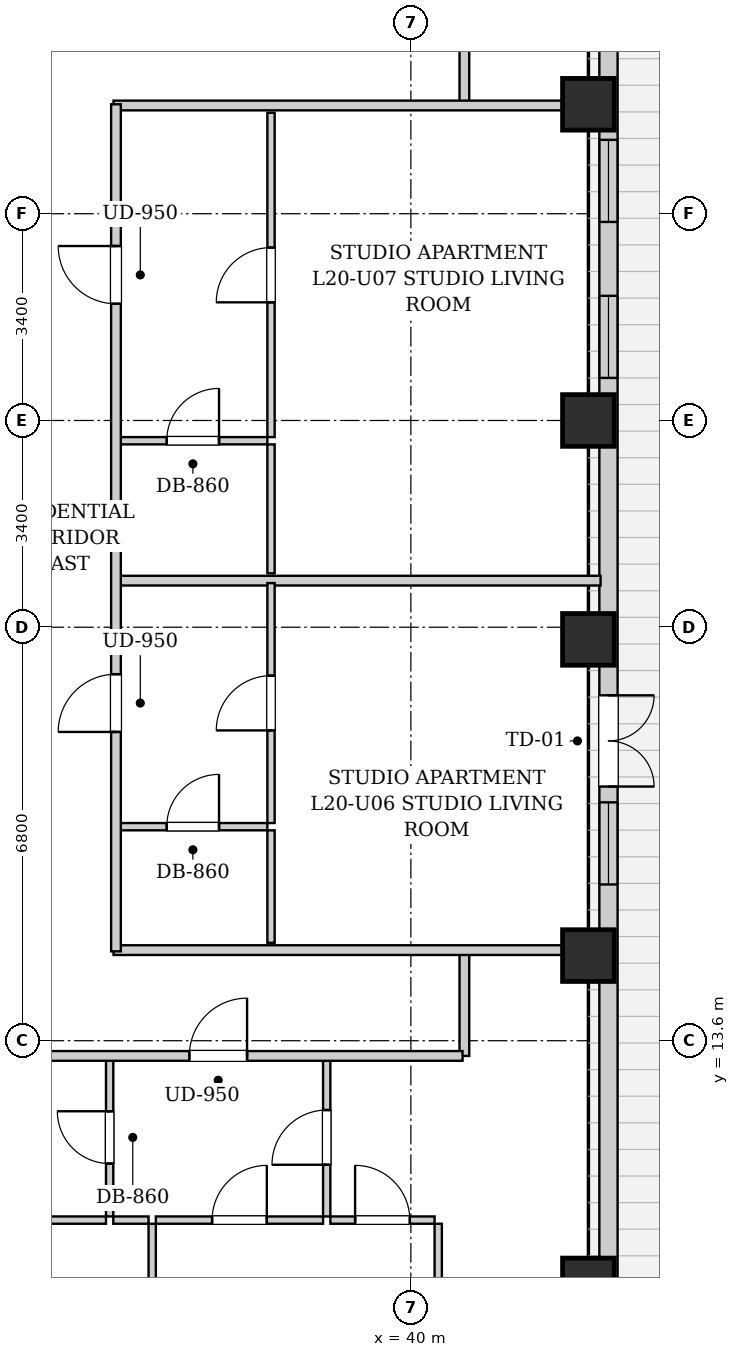
"""IFC4 building model, lengths in metres.
Left out: names, types, materials, properties, quantities, classifications, styles, units other than length and angle.
Written with IfcOpenShell. Run it as: python <this file> out.ifc"""

import sys

from ifc_helpers import new_model, si_unit, direction, frame, frame_2d, origin, origin_2d, place, context, subcontext, project, spatial, rectangle, extrude, element, fill, save


model = new_model("IFC4")
c1 = context("Model", 3, precision=1e-05, world=origin(), true_north=direction((0.0, 1.0)))
c2 = subcontext(c1, "Body", "Model", "MODEL_VIEW")
j1 = project(units=[si_unit("LENGTHUNIT", "METRE"), si_unit("PLANEANGLEUNIT", "RADIAN")], contexts=[c1])
p1 = place(None, origin())
s1 = spatial("IfcSite", under=j1, at=p1, CompositionType="ELEMENT")
p2 = place(p1, origin())
s2 = spatial("IfcBuilding", under=s1, at=p2, CompositionType="ELEMENT")
p3 = place(p2, frame((0.0, 0.0, 75.1)))
s3 = spatial("IfcBuildingStorey", under=s2, at=p3, CompositionType="ELEMENT", Elevation=75.1)
for number, where, z_axis, x_axis in (
    (1, (42.92, 9.6, 0.0), (0.0, 0.0, 1.0), (1.0, 0.0, 0.0)),
    (2, (42.92, 15.0, 0.0), (0.0, 0.0, 1.0), (1.0, 0.0, 0.0)),
    (3, (42.92, 20.2, 0.0), (0.0, 0.0, 1.0), (1.0, 0.0, 0.0)),
    (4, (42.92, 23.8, 0.0), (0.0, 0.0, 1.0), (1.0, 0.0, 0.0)),
    (5, (42.92, 29.0, 0.0), (0.0, 0.0, 1.0), (1.0, 0.0, 0.0)),
):
    element("IfcColumn", number, at=place(p3, frame(where, z_axis=z_axis, x_axis=x_axis)), inside=s3, PredefinedType="COLUMN", context=c2, shape_type="SweptSolid", body=[
        extrude(rectangle(XDim=0.85, YDim=0.85, at=origin_2d()), origin(), (0.0, 0.0, 1.0), 3.2),
    ])
p4 = place(p3, frame((43.25, 40.8, 0.0), z_axis=(0.0, 0.0, 1.0), x_axis=(0.0, -1.0, 0.0)))
e6 = element("IfcWall", 6, at=p4, inside=s3, PredefinedType="SOLIDWALL", context=c2, shape_type="SweptSolid", body=[
    extrude(rectangle(XDim=38.3, YDim=0.3, at=frame_2d((19.15, 0.0))), origin(), (0.0, 0.0, 1.0), 2.94),
])
p5 = place(p4, frame((21.52, 0.0, 0.0)))
e7 = element("IfcOpeningElement", 7, at=p5, cuts=e6, PredefinedType="OPENING", context=c2, shape_type="SweptSolid", body=[
    extrude(rectangle(XDim=1.5, YDim=1.982, at=frame_2d((0.75, 0.991))), frame((0.0, 0.16, 0.0), z_axis=(0.0, -1.0, 0.0), x_axis=(1.0, 0.0, 0.0)), (0.0, 0.0, 1.0), 0.32),
])
p6 = place(p4, frame((33.495, 0.0, 0.55)))
e8 = element("IfcOpeningElement", 8, at=p6, cuts=e6, PredefinedType="OPENING", context=c2, shape_type="SweptSolid", body=[
    extrude(rectangle(XDim=1.35, YDim=1.2, at=frame_2d((0.675, 0.6))), frame((0.0, 0.16, 0.0), z_axis=(0.0, -1.0, 0.0), x_axis=(1.0, 0.0, 0.0)), (0.0, 0.0, 1.0), 0.32),
])
p7 = place(p4, frame((31.785, 0.0, 0.55)))
e9 = element("IfcOpeningElement", 9, at=p7, cuts=e6, PredefinedType="OPENING", context=c2, shape_type="SweptSolid", body=[
    extrude(rectangle(XDim=1.35, YDim=1.2, at=frame_2d((0.675, 0.6))), frame((0.0, 0.16, 0.0), z_axis=(0.0, -1.0, 0.0), x_axis=(1.0, 0.0, 0.0)), (0.0, 0.0, 1.0), 0.32),
])
p8 = place(p4, frame((23.28, 0.0, 0.55)))
e10 = element("IfcOpeningElement", 10, at=p8, cuts=e6, PredefinedType="OPENING", context=c2, shape_type="SweptSolid", body=[
    extrude(rectangle(XDim=1.35, YDim=1.2, at=frame_2d((0.675, 0.6))), frame((0.0, 0.16, 0.0), z_axis=(0.0, -1.0, 0.0), x_axis=(1.0, 0.0, 0.0)), (0.0, 0.0, 1.0), 0.32),
])
p9 = place(p4, frame((14.95, 0.0, 0.55)))
e11 = element("IfcOpeningElement", 11, at=p9, cuts=e6, PredefinedType="OPENING", context=c2, shape_type="SweptSolid", body=[
    extrude(rectangle(XDim=1.35, YDim=1.2, at=frame_2d((0.675, 0.6))), frame((0.0, 0.16, 0.0), z_axis=(0.0, -1.0, 0.0), x_axis=(1.0, 0.0, 0.0)), (0.0, 0.0, 1.0), 0.32),
])
p10 = place(p4, frame((12.385, 0.0, 0.55)))
e12 = element("IfcOpeningElement", 12, at=p10, cuts=e6, PredefinedType="OPENING", context=c2, shape_type="SweptSolid", body=[
    extrude(rectangle(XDim=1.35, YDim=1.2, at=frame_2d((0.675, 0.6))), frame((0.0, 0.16, 0.0), z_axis=(0.0, -1.0, 0.0), x_axis=(1.0, 0.0, 0.0)), (0.0, 0.0, 1.0), 0.32),
])
for number, where, z_axis, x_axis in (
    (13, (40.88, 13.35, 0.0), (0.0, 0.0, 1.0), (0.0, 1.0, 0.0)),
    (14, (40.88, 28.98, 0.0), (0.0, 0.0, 1.0), (0.0, 1.0, 0.0)),
):
    element("IfcWall", number, at=place(p3, frame(where, z_axis=z_axis, x_axis=x_axis)), inside=s3, PredefinedType="PARTITIONING", context=c2, shape_type="SweptSolid", body=[
        extrude(rectangle(XDim=1.74, YDim=0.16, at=frame_2d((0.87, 0.0))), origin(), (0.0, 0.0, 1.0), 2.94),
    ])
for number, where, z_axis, x_axis in (
    (15, (35.11, 15.09, 0.0), (0.0, 0.0, 1.0), (1.0, 0.0, 0.0)),
    (16, (35.11, 28.98, 0.0), (0.0, 0.0, 1.0), (1.0, 0.0, 0.0)),
):
    element("IfcWall", number, at=place(p3, frame(where, z_axis=z_axis, x_axis=x_axis)), inside=s3, PredefinedType="PARTITIONING", context=c2, shape_type="SweptSolid", body=[
        extrude(rectangle(XDim=8.01, YDim=0.16, at=frame_2d((4.005, 0.0))), origin(), (0.0, 0.0, 1.0), 2.309),
    ])
p11 = place(p3, frame((35.046, 10.71, 0.0), z_axis=(0.0, 0.0, 1.0), x_axis=(0.0, 1.0, 0.0)))
e17 = element("IfcWall", 17, at=p11, inside=s3, PredefinedType="PARTITIONING", context=c2, shape_type="SweptSolid", body=[
    extrude(rectangle(XDim=2.6, YDim=0.12, at=frame_2d((1.3, 0.0))), origin(), (0.0, 0.0, 1.0), 2.94),
])
p12 = place(p11, frame((0.87, 0.0, 0.0)))
e18 = element("IfcOpeningElement", 18, at=p12, cuts=e17, PredefinedType="OPENING", context=c2, shape_type="SweptSolid", body=[
    extrude(rectangle(XDim=0.86, YDim=2.05, at=frame_2d((0.43, 1.025))), frame((0.0, 0.07, 0.0), z_axis=(0.0, -1.0, 0.0), x_axis=(1.0, 0.0, 0.0)), (0.0, 0.0, 1.0), 0.14),
])
p13 = place(p3, frame((32.586, 10.65, 0.0), z_axis=(0.0, 0.0, 1.0), x_axis=(1.0, 0.0, 0.0)))
e19 = element("IfcWall", 19, at=p13, inside=s3, PredefinedType="PARTITIONING", context=c2, shape_type="SweptSolid", body=[
    extrude(rectangle(XDim=2.4, YDim=0.12, at=frame_2d((1.2, 0.0))), origin(), (0.0, 0.0, 1.0), 2.94),
])
p14 = place(p3, frame((38.616, 10.71, 0.0), z_axis=(0.0, 0.0, 1.0), x_axis=(0.0, 1.0, 0.0)))
e20 = element("IfcWall", 20, at=p14, inside=s3, PredefinedType="PARTITIONING", context=c2, shape_type="SweptSolid", body=[
    extrude(rectangle(XDim=2.6, YDim=0.12, at=frame_2d((1.3, 0.0))), origin(), (0.0, 0.0, 1.0), 2.94),
])
p15 = place(p14, frame((0.85, 0.0, 0.0)))
e21 = element("IfcOpeningElement", 21, at=p15, cuts=e20, PredefinedType="OPENING", context=c2, shape_type="SweptSolid", body=[
    extrude(rectangle(XDim=0.9, YDim=2.05, at=frame_2d((0.45, 1.025))), frame((0.0, 0.07, 0.0), z_axis=(0.0, -1.0, 0.0), x_axis=(1.0, 0.0, 0.0)), (0.0, 0.0, 1.0), 0.14),
])
p16 = place(p3, frame((35.106, 10.65, 0.0), z_axis=(0.0, 0.0, 1.0), x_axis=(1.0, 0.0, 0.0)))
e22 = element("IfcWall", 22, at=p16, inside=s3, PredefinedType="PARTITIONING", context=c2, shape_type="SweptSolid", body=[
    extrude(rectangle(XDim=0.58, YDim=0.12, at=frame_2d((0.29, 0.0))), origin(), (0.0, 0.0, 1.0), 2.94),
])
p17 = place(p3, frame((35.806, 10.65, 0.0), z_axis=(0.0, 0.0, 1.0), x_axis=(1.0, 0.0, 0.0)))
e23 = element("IfcWall", 23, at=p17, inside=s3, PredefinedType="PARTITIONING", context=c2, shape_type="SweptSolid", body=[
    extrude(rectangle(XDim=2.75, YDim=0.12, at=frame_2d((1.375, 0.0))), origin(), (0.0, 0.0, 1.0), 2.94),
])
p18 = place(p17, frame((0.925, 0.0, 0.0)))
e24 = element("IfcOpeningElement", 24, at=p18, cuts=e23, PredefinedType="OPENING", context=c2, shape_type="SweptSolid", body=[
    extrude(rectangle(XDim=0.9, YDim=2.05, at=frame_2d((0.45, 1.025))), frame((0.0, 0.07, 0.0), z_axis=(0.0, -1.0, 0.0), x_axis=(1.0, 0.0, 0.0)), (0.0, 0.0, 1.0), 0.14),
])
p19 = place(p3, frame((38.676, 10.65, 0.0), z_axis=(0.0, 0.0, 1.0), x_axis=(1.0, 0.0, 0.0)))
e25 = element("IfcWall", 25, at=p19, inside=s3, PredefinedType="PARTITIONING", context=c2, shape_type="SweptSolid", body=[
    extrude(rectangle(XDim=1.714, YDim=0.12, at=frame_2d((0.857, 0.0))), origin(), (0.0, 0.0, 1.0), 2.94),
])
p20 = place(p19, frame((0.407, 0.0, 0.0)))
e26 = element("IfcOpeningElement", 26, at=p20, cuts=e25, PredefinedType="OPENING", context=c2, shape_type="SweptSolid", body=[
    extrude(rectangle(XDim=0.9, YDim=2.05, at=frame_2d((0.45, 1.025))), frame((0.0, 0.07, 0.0), z_axis=(0.0, -1.0, 0.0), x_axis=(1.0, 0.0, 0.0)), (0.0, 0.0, 1.0), 0.14),
])
p21 = place(p3, frame((35.746, 0.28, 0.0), z_axis=(0.0, 0.0, 1.0), x_axis=(0.0, 1.0, 0.0)))
e27 = element("IfcWall", 27, at=p21, inside=s3, PredefinedType="PARTITIONING", context=c2, shape_type="SweptSolid", body=[
    extrude(rectangle(XDim=10.31, YDim=0.12, at=frame_2d((5.155, 0.0))), origin(), (0.0, 0.0, 1.0), 2.94),
])
p22 = place(p21, frame((4.69, 0.0, 0.0)))
e28 = element("IfcOpeningElement", 28, at=p22, cuts=e27, PredefinedType="OPENING", context=c2, shape_type="SweptSolid", body=[
    extrude(rectangle(XDim=0.9, YDim=2.05, at=frame_2d((0.45, 1.025))), frame((0.0, 0.07, 0.0), z_axis=(0.0, -1.0, 0.0), x_axis=(1.0, 0.0, 0.0)), (0.0, 0.0, 1.0), 0.14),
])
p23 = place(p3, frame((40.45, 0.28, 0.0), z_axis=(0.0, 0.0, 1.0), x_axis=(0.0, 1.0, 0.0)))
e29 = element("IfcWall", 29, at=p23, inside=s3, PredefinedType="PARTITIONING", context=c2, shape_type="SweptSolid", body=[
    extrude(rectangle(XDim=10.31, YDim=0.12, at=frame_2d((5.155, 0.0))), origin(), (0.0, 0.0, 1.0), 2.94),
])
p24 = place(p23, frame((4.69, 0.0, 0.0)))
e30 = element("IfcOpeningElement", 30, at=p24, cuts=e29, PredefinedType="OPENING", context=c2, shape_type="SweptSolid", body=[
    extrude(rectangle(XDim=0.9, YDim=2.05, at=frame_2d((0.45, 1.025))), frame((0.0, 0.07, 0.0), z_axis=(0.0, -1.0, 0.0), x_axis=(1.0, 0.0, 0.0)), (0.0, 0.0, 1.0), 0.14),
])
p25 = place(p3, frame((35.19, 21.166, 0.0), z_axis=(0.0, 0.0, 1.0), x_axis=(1.0, 0.0, 0.0)))
e31 = element("IfcWall", 31, at=p25, inside=s3, PredefinedType="PARTITIONING", context=c2, shape_type="SweptSolid", body=[
    extrude(rectangle(XDim=7.93, YDim=0.16, at=frame_2d((3.965, 0.0))), origin(), (0.0, 0.0, 1.0), 2.94),
])
p26 = place(p3, frame((35.19, 17.12, 0.0), z_axis=(0.0, 0.0, 1.0), x_axis=(1.0, 0.0, 0.0)))
e32 = element("IfcWall", 32, at=p26, inside=s3, PredefinedType="PARTITIONING", context=c2, shape_type="SweptSolid", body=[
    extrude(rectangle(XDim=2.45, YDim=0.12, at=frame_2d((1.225, 0.0))), origin(), (0.0, 0.0, 1.0), 2.94),
])
p27 = place(p26, frame((0.795, 0.0, 0.0)))
e33 = element("IfcOpeningElement", 33, at=p27, cuts=e32, PredefinedType="OPENING", context=c2, shape_type="SweptSolid", body=[
    extrude(rectangle(XDim=0.86, YDim=2.05, at=frame_2d((0.43, 1.025))), frame((0.0, 0.07, 0.0), z_axis=(0.0, -1.0, 0.0), x_axis=(1.0, 0.0, 0.0)), (0.0, 0.0, 1.0), 0.14),
])
p28 = place(p3, frame((37.7, 15.21, 0.0), z_axis=(0.0, 0.0, 1.0), x_axis=(0.0, 1.0, 0.0)))
e34 = element("IfcWall", 34, at=p28, inside=s3, PredefinedType="PARTITIONING", context=c2, shape_type="SweptSolid", body=[
    extrude(rectangle(XDim=1.85, YDim=0.12, at=frame_2d((0.925, 0.0))), origin(), (0.0, 0.0, 1.0), 2.94),
])
p29 = place(p3, frame((37.7, 17.18, 0.0), z_axis=(0.0, 0.0, 1.0), x_axis=(0.0, 1.0, 0.0)))
e35 = element("IfcWall", 35, at=p29, inside=s3, PredefinedType="PARTITIONING", context=c2, shape_type="SweptSolid", body=[
    extrude(rectangle(XDim=3.946, YDim=0.12, at=frame_2d((1.973, 0.0))), origin(), (0.0, 0.0, 1.0), 2.94),
])
p30 = place(p29, frame((1.523, 0.0, 0.0)))
e36 = element("IfcOpeningElement", 36, at=p30, cuts=e35, PredefinedType="OPENING", context=c2, shape_type="SweptSolid", body=[
    extrude(rectangle(XDim=0.9, YDim=2.05, at=frame_2d((0.45, 1.025))), frame((0.0, 0.07, 0.0), z_axis=(0.0, -1.0, 0.0), x_axis=(1.0, 0.0, 0.0)), (0.0, 0.0, 1.0), 0.14),
])
p31 = place(p3, frame((35.19, 23.467, 0.0), z_axis=(0.0, 0.0, 1.0), x_axis=(1.0, 0.0, 0.0)))
e37 = element("IfcWall", 37, at=p31, inside=s3, PredefinedType="PARTITIONING", context=c2, shape_type="SweptSolid", body=[
    extrude(rectangle(XDim=2.45, YDim=0.12, at=frame_2d((1.225, 0.0))), origin(), (0.0, 0.0, 1.0), 2.94),
])
p32 = place(p31, frame((0.795, 0.0, 0.0)))
e38 = element("IfcOpeningElement", 38, at=p32, cuts=e37, PredefinedType="OPENING", context=c2, shape_type="SweptSolid", body=[
    extrude(rectangle(XDim=0.86, YDim=2.05, at=frame_2d((0.43, 1.025))), frame((0.0, 0.07, 0.0), z_axis=(0.0, -1.0, 0.0), x_axis=(1.0, 0.0, 0.0)), (0.0, 0.0, 1.0), 0.14),
])
p33 = place(p3, frame((37.7, 21.286, 0.0), z_axis=(0.0, 0.0, 1.0), x_axis=(0.0, 1.0, 0.0)))
e39 = element("IfcWall", 39, at=p33, inside=s3, PredefinedType="PARTITIONING", context=c2, shape_type="SweptSolid", body=[
    extrude(rectangle(XDim=2.121, YDim=0.12, at=frame_2d((1.061, 0.0))), origin(), (0.0, 0.0, 1.0), 2.94),
])
p34 = place(p3, frame((37.7, 23.527, 0.0), z_axis=(0.0, 0.0, 1.0), x_axis=(0.0, 1.0, 0.0)))
e40 = element("IfcWall", 40, at=p34, inside=s3, PredefinedType="PARTITIONING", context=c2, shape_type="SweptSolid", body=[
    extrude(rectangle(XDim=5.333, YDim=0.12, at=frame_2d((2.667, 0.0))), origin(), (0.0, 0.0, 1.0), 2.94),
])
p35 = place(p34, frame((2.216, 0.0, 0.0)))
e41 = element("IfcOpeningElement", 41, at=p35, cuts=e40, PredefinedType="OPENING", context=c2, shape_type="SweptSolid", body=[
    extrude(rectangle(XDim=0.9, YDim=2.05, at=frame_2d((0.45, 1.025))), frame((0.0, 0.07, 0.0), z_axis=(0.0, -1.0, 0.0), x_axis=(1.0, 0.0, 0.0)), (0.0, 0.0, 1.0), 0.14),
])
p36 = place(p3, frame((10.05, 13.35, 0.0), z_axis=(0.0, 0.0, 1.0), x_axis=(1.0, 0.0, 0.0)))
e42 = element("IfcWall", 42, at=p36, inside=s3, PredefinedType="PARTITIONING", context=c2, shape_type="SweptSolid", body=[
    extrude(rectangle(XDim=30.8, YDim=0.16, at=frame_2d((15.4, 0.0))), origin(), (0.0, 0.0, 1.0), 2.94),
])
p37 = place(p36, frame((2.893, 0.0, 0.0)))
e43 = element("IfcOpeningElement", 43, at=p37, cuts=e42, PredefinedType="OPENING", context=c2, shape_type="SweptSolid", body=[
    extrude(rectangle(XDim=0.95, YDim=2.1, at=frame_2d((0.475, 1.05))), frame((0.0, 0.09, 0.0), z_axis=(0.0, -1.0, 0.0), x_axis=(1.0, 0.0, 0.0)), (0.0, 0.0, 1.0), 0.18),
])
p38 = place(p36, frame((9.161, 0.0, 0.0)))
e44 = element("IfcOpeningElement", 44, at=p38, cuts=e42, PredefinedType="OPENING", context=c2, shape_type="SweptSolid", body=[
    extrude(rectangle(XDim=0.95, YDim=2.1, at=frame_2d((0.475, 1.05))), frame((0.0, 0.09, 0.0), z_axis=(0.0, -1.0, 0.0), x_axis=(1.0, 0.0, 0.0)), (0.0, 0.0, 1.0), 0.18),
])
p39 = place(p36, frame((26.306, 0.0, 0.0)))
e45 = element("IfcOpeningElement", 45, at=p39, cuts=e42, PredefinedType="OPENING", context=c2, shape_type="SweptSolid", body=[
    extrude(rectangle(XDim=0.95, YDim=2.1, at=frame_2d((0.475, 1.05))), frame((0.0, 0.09, 0.0), z_axis=(0.0, -1.0, 0.0), x_axis=(1.0, 0.0, 0.0)), (0.0, 0.0, 1.0), 0.18),
])
p40 = place(p3, frame((35.15, 15.07, 0.0), z_axis=(0.0, 0.0, 1.0), x_axis=(0.0, 1.0, 0.0)))
e46 = element("IfcWall", 46, at=p40, inside=s3, PredefinedType="PARTITIONING", context=c2, shape_type="SweptSolid", body=[
    extrude(rectangle(XDim=13.93, YDim=0.16, at=frame_2d((6.965, 0.0))), origin(), (0.0, 0.0, 1.0), 2.94),
])
p41 = place(p40, frame((3.608, 0.0, 0.0)))
e47 = element("IfcOpeningElement", 47, at=p41, cuts=e46, PredefinedType="OPENING", context=c2, shape_type="SweptSolid", body=[
    extrude(rectangle(XDim=0.95, YDim=2.1, at=frame_2d((0.475, 1.05))), frame((0.0, 0.09, 0.0), z_axis=(0.0, -1.0, 0.0), x_axis=(1.0, 0.0, 0.0)), (0.0, 0.0, 1.0), 0.18),
])
p42 = place(p40, frame((10.649, 0.0, 0.0)))
e48 = element("IfcOpeningElement", 48, at=p42, cuts=e46, PredefinedType="OPENING", context=c2, shape_type="SweptSolid", body=[
    extrude(rectangle(XDim=0.95, YDim=2.1, at=frame_2d((0.475, 1.05))), frame((0.0, 0.09, 0.0), z_axis=(0.0, -1.0, 0.0), x_axis=(1.0, 0.0, 0.0)), (0.0, 0.0, 1.0), 0.18),
])
p43 = place(p12, origin())
e49 = element("IfcDoor", 49, at=p43, inside=s3, OperationType="SINGLE_SWING_RIGHT", PredefinedType="DOOR", context=c2, shape_type="SweptSolid", body=[
    extrude(rectangle(XDim=0.86, YDim=2.05, at=frame_2d((0.43, 1.025))), frame((0.0, 0.025, 0.0), z_axis=(0.0, -1.0, 0.0), x_axis=(1.0, 0.0, 0.0)), (0.0, 0.0, 1.0), 0.05),
])
fill(e18, e49)
p44 = place(p15, origin())
e50 = element("IfcDoor", 50, at=p44, inside=s3, OperationType="SINGLE_SWING_LEFT", PredefinedType="DOOR", context=c2, shape_type="SweptSolid", body=[
    extrude(rectangle(XDim=0.9, YDim=2.05, at=frame_2d((0.45, 1.025))), frame((0.0, 0.025, 0.0), z_axis=(0.0, -1.0, 0.0), x_axis=(1.0, 0.0, 0.0)), (0.0, 0.0, 1.0), 0.05),
])
fill(e21, e50)
p45 = place(p18, origin())
e51 = element("IfcDoor", 51, at=p45, inside=s3, OperationType="SINGLE_SWING_RIGHT", PredefinedType="DOOR", context=c2, shape_type="SweptSolid", body=[
    extrude(rectangle(XDim=0.9, YDim=2.05, at=frame_2d((0.45, 1.025))), frame((0.0, 0.025, 0.0), z_axis=(0.0, -1.0, 0.0), x_axis=(1.0, 0.0, 0.0)), (0.0, 0.0, 1.0), 0.05),
])
fill(e24, e51)
p46 = place(p20, origin())
e52 = element("IfcDoor", 52, at=p46, inside=s3, OperationType="SINGLE_SWING_LEFT", PredefinedType="DOOR", context=c2, shape_type="SweptSolid", body=[
    extrude(rectangle(XDim=0.9, YDim=2.05, at=frame_2d((0.45, 1.025))), frame((0.0, 0.025, 0.0), z_axis=(0.0, -1.0, 0.0), x_axis=(1.0, 0.0, 0.0)), (0.0, 0.0, 1.0), 0.05),
])
fill(e26, e52)
p47 = place(p27, origin())
e53 = element("IfcDoor", 53, at=p47, inside=s3, OperationType="SINGLE_SWING_RIGHT", PredefinedType="DOOR", context=c2, shape_type="SweptSolid", body=[
    extrude(rectangle(XDim=0.86, YDim=2.05, at=frame_2d((0.43, 1.025))), frame((0.0, 0.025, 0.0), z_axis=(0.0, -1.0, 0.0), x_axis=(1.0, 0.0, 0.0)), (0.0, 0.0, 1.0), 0.05),
])
fill(e33, e53)
p48 = place(p30, origin())
e54 = element("IfcDoor", 54, at=p48, inside=s3, OperationType="SINGLE_SWING_LEFT", PredefinedType="DOOR", context=c2, shape_type="SweptSolid", body=[
    extrude(rectangle(XDim=0.9, YDim=2.05, at=frame_2d((0.45, 1.025))), frame((0.0, 0.025, 0.0), z_axis=(0.0, -1.0, 0.0), x_axis=(1.0, 0.0, 0.0)), (0.0, 0.0, 1.0), 0.05),
])
fill(e36, e54)
p49 = place(p32, origin())
e55 = element("IfcDoor", 55, at=p49, inside=s3, OperationType="SINGLE_SWING_RIGHT", PredefinedType="DOOR", context=c2, shape_type="SweptSolid", body=[
    extrude(rectangle(XDim=0.86, YDim=2.05, at=frame_2d((0.43, 1.025))), frame((0.0, 0.025, 0.0), z_axis=(0.0, -1.0, 0.0), x_axis=(1.0, 0.0, 0.0)), (0.0, 0.0, 1.0), 0.05),
])
fill(e38, e55)
p50 = place(p35, origin())
e56 = element("IfcDoor", 56, at=p50, inside=s3, OperationType="SINGLE_SWING_LEFT", PredefinedType="DOOR", context=c2, shape_type="SweptSolid", body=[
    extrude(rectangle(XDim=0.9, YDim=2.05, at=frame_2d((0.45, 1.025))), frame((0.0, 0.025, 0.0), z_axis=(0.0, -1.0, 0.0), x_axis=(1.0, 0.0, 0.0)), (0.0, 0.0, 1.0), 0.05),
])
fill(e41, e56)
p51 = place(p39, origin())
e57 = element("IfcDoor", 57, at=p51, inside=s3, OperationType="SINGLE_SWING_RIGHT", PredefinedType="DOOR", context=c2, shape_type="SweptSolid", body=[
    extrude(rectangle(XDim=0.95, YDim=2.1, at=frame_2d((0.475, 1.05))), frame((0.0, 0.025, 0.0), z_axis=(0.0, -1.0, 0.0), x_axis=(1.0, 0.0, 0.0)), (0.0, 0.0, 1.0), 0.05),
])
fill(e45, e57)
p52 = place(p41, origin())
e58 = element("IfcDoor", 58, at=p52, inside=s3, OperationType="SINGLE_SWING_LEFT", PredefinedType="DOOR", context=c2, shape_type="SweptSolid", body=[
    extrude(rectangle(XDim=0.95, YDim=2.1, at=frame_2d((0.475, 1.05))), frame((0.0, 0.025, 0.0), z_axis=(0.0, -1.0, 0.0), x_axis=(1.0, 0.0, 0.0)), (0.0, 0.0, 1.0), 0.05),
])
fill(e47, e58)
p53 = place(p42, origin())
e59 = element("IfcDoor", 59, at=p53, inside=s3, OperationType="SINGLE_SWING_RIGHT", PredefinedType="DOOR", context=c2, shape_type="SweptSolid", body=[
    extrude(rectangle(XDim=0.95, YDim=2.1, at=frame_2d((0.475, 1.05))), frame((0.0, 0.025, 0.0), z_axis=(0.0, -1.0, 0.0), x_axis=(1.0, 0.0, 0.0)), (0.0, 0.0, 1.0), 0.05),
])
fill(e48, e59)
p54 = place(p5, origin())
e60 = element("IfcDoor", 60, at=p54, inside=s3, OperationType="DOUBLE_SWING_LEFT", PredefinedType="DOOR", context=c2, shape_type="SweptSolid", body=[
    extrude(rectangle(XDim=1.5, YDim=1.982, at=frame_2d((0.75, 0.991))), frame((0.0, 0.025, 0.0), z_axis=(0.0, -1.0, 0.0), x_axis=(1.0, 0.0, 0.0)), (0.0, 0.0, 1.0), 0.05),
])
fill(e7, e60)
p55 = place(p8, origin())
e61 = element("IfcWindow", 61, at=p55, inside=s3, PartitioningType="SINGLE_PANEL", PredefinedType="WINDOW", context=c2, shape_type="SweptSolid", body=[
    extrude(rectangle(XDim=1.35, YDim=1.2, at=frame_2d((0.675, 0.6))), frame((0.0, 0.03, 0.0), z_axis=(0.0, -1.0, 0.0), x_axis=(1.0, 0.0, 0.0)), (0.0, 0.0, 1.0), 0.06),
])
fill(e10, e61)
p56 = place(p9, origin())
e62 = element("IfcWindow", 62, at=p56, inside=s3, PartitioningType="SINGLE_PANEL", PredefinedType="WINDOW", context=c2, shape_type="SweptSolid", body=[
    extrude(rectangle(XDim=1.35, YDim=1.2, at=frame_2d((0.675, 0.6))), frame((0.0, 0.03, 0.0), z_axis=(0.0, -1.0, 0.0), x_axis=(1.0, 0.0, 0.0)), (0.0, 0.0, 1.0), 0.06),
])
fill(e11, e62)
p57 = place(p10, origin())
e63 = element("IfcWindow", 63, at=p57, inside=s3, PartitioningType="SINGLE_PANEL", PredefinedType="WINDOW", context=c2, shape_type="SweptSolid", body=[
    extrude(rectangle(XDim=1.35, YDim=1.2, at=frame_2d((0.675, 0.6))), frame((0.0, 0.03, 0.0), z_axis=(0.0, -1.0, 0.0), x_axis=(1.0, 0.0, 0.0)), (0.0, 0.0, 1.0), 0.06),
])
fill(e12, e63)
save(model, sys.argv[1])
